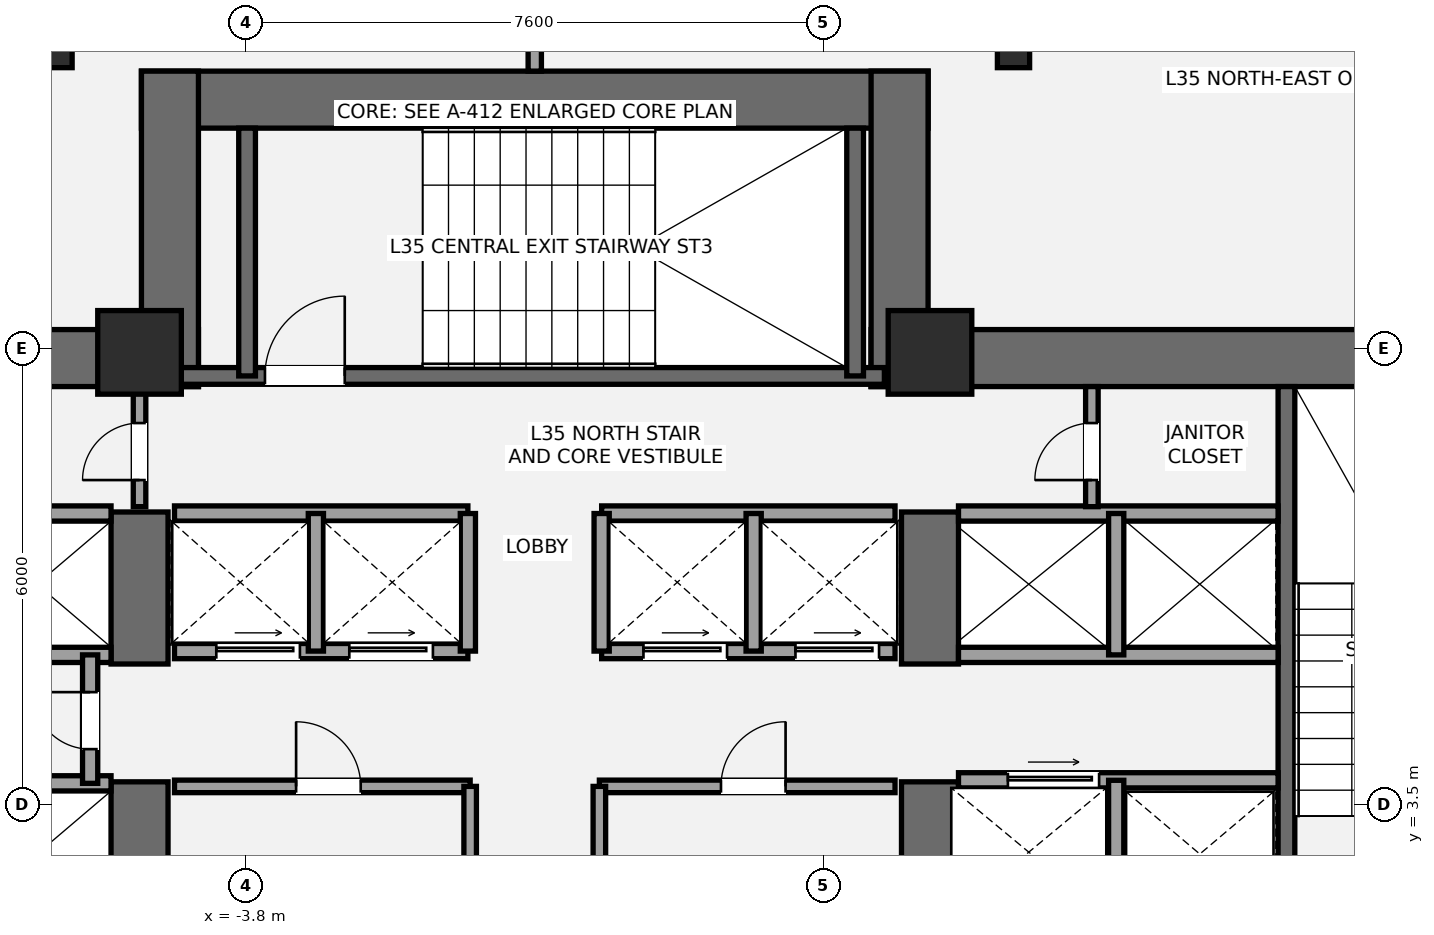
"""IFC4 building model, lengths in metres.
Left out: names, types, materials, properties, quantities, classifications, styles, units other than length and angle.
Written with IfcOpenShell. Run it as: python <this file> out.ifc"""

import sys

from ifc_helpers import new_model, si_unit, direction, frame, frame_2d, origin, origin_2d, place, context, subcontext, project, spatial, rectangle, i_section, extrude, element, fill, save


model = new_model("IFC4")
c1 = context("Model", 3, precision=1e-05, world=origin(), true_north=direction((0.0, 1.0)))
c2 = subcontext(c1, "Body", "Model", "MODEL_VIEW")
j1 = project(units=[si_unit("LENGTHUNIT", "METRE"), si_unit("PLANEANGLEUNIT", "RADIAN")], contexts=[c1])
p1 = place(None, origin())
s1 = spatial("IfcSite", under=j1, at=p1, CompositionType="ELEMENT")
p2 = place(p1, origin())
s2 = spatial("IfcBuilding", under=s1, at=p2, CompositionType="ELEMENT")
p3 = place(p2, frame((0.0, 0.0, 131.6)))
s3 = spatial("IfcBuildingStorey", under=s2, at=p3, CompositionType="ELEMENT", Elevation=131.6)
p4 = place(p3, frame((-13.9, 9.375, 0.0), z_axis=(0.0, 0.0, 1.0), x_axis=(1.0, 0.0, 0.0)))
e1 = element("IfcWall", 1, at=p4, inside=s3, PredefinedType="SHEAR", context=c2, shape_type="SweptSolid", body=[
    extrude(rectangle(XDim=9.475, YDim=0.75, at=frame_2d((4.737, 0.0))), origin(), (0.0, 0.0, 1.0), 3.5),
])
p5 = place(p3, frame((-5.2, 1.1, 0.0), z_axis=(0.0, 0.0, 1.0), x_axis=(0.0, 1.0, 0.0)))
e2 = element("IfcWall", 2, at=p5, inside=s3, PredefinedType="SHEAR", context=c2, shape_type="SweptSolid", body=[
    extrude(rectangle(XDim=2.7, YDim=0.75, at=frame_2d((1.35, 0.0))), origin(), (0.0, 0.0, 1.0), 3.5),
])
p6 = place(p3, frame((-5.2, 5.35, 0.0), z_axis=(0.0, 0.0, 1.0), x_axis=(0.0, 1.0, 0.0)))
e3 = element("IfcWall", 3, at=p6, inside=s3, PredefinedType="SHEAR", context=c2, shape_type="SweptSolid", body=[
    extrude(rectangle(XDim=2.0, YDim=0.75, at=frame_2d((1.0, 0.0))), origin(), (0.0, 0.0, 1.0), 3.5),
])
p7 = place(p3, frame((4.425, 9.375, 0.0), z_axis=(0.0, 0.0, 1.0), x_axis=(1.0, 0.0, 0.0)))
e4 = element("IfcWall", 4, at=p7, inside=s3, PredefinedType="SHEAR", context=c2, shape_type="SweptSolid", body=[
    extrude(rectangle(XDim=9.475, YDim=0.75, at=frame_2d((4.737, 0.0))), origin(), (0.0, 0.0, 1.0), 3.5),
])
p8 = place(p3, frame((5.2, 1.1, 0.0), z_axis=(0.0, 0.0, 1.0), x_axis=(0.0, 1.0, 0.0)))
e5 = element("IfcWall", 5, at=p8, inside=s3, PredefinedType="SHEAR", context=c2, shape_type="SweptSolid", body=[
    extrude(rectangle(XDim=2.7, YDim=0.75, at=frame_2d((1.35, 0.0))), origin(), (0.0, 0.0, 1.0), 3.5),
])
p9 = place(p3, frame((5.2, 5.35, 0.0), z_axis=(0.0, 0.0, 1.0), x_axis=(0.0, 1.0, 0.0)))
e6 = element("IfcWall", 6, at=p9, inside=s3, PredefinedType="SHEAR", context=c2, shape_type="SweptSolid", body=[
    extrude(rectangle(XDim=2.0, YDim=0.75, at=frame_2d((1.0, 0.0))), origin(), (0.0, 0.0, 1.0), 3.5),
])
p10 = place(p3, frame((9.89, 1.85, 0.0), z_axis=(0.0, 0.0, 1.0), x_axis=(0.0, 1.0, 0.0)))
e7 = element("IfcWall", 7, at=p10, inside=s3, PredefinedType="SHEAR", context=c2, shape_type="SweptSolid", body=[
    extrude(rectangle(XDim=7.15, YDim=0.22, at=frame_2d((3.575, 0.0))), origin(), (0.0, 0.0, 1.0), 3.5),
])
p11 = place(p3, frame((-5.175, 12.775, 0.0), z_axis=(0.0, 0.0, 1.0), x_axis=(1.0, 0.0, 0.0)))
e8 = element("IfcWall", 8, at=p11, inside=s3, PredefinedType="SHEAR", context=c2, shape_type="SweptSolid", body=[
    extrude(rectangle(XDim=10.35, YDim=0.75, at=frame_2d((5.175, 0.0))), origin(), (0.0, 0.0, 1.0), 3.5),
])
for number, where, z_axis, x_axis in (
    (9, (-4.8, 9.0, 0.0), (0.0, 0.0, 1.0), (0.0, 1.0, 0.0)),
    (10, (4.8, 9.0, 0.0), (0.0, 0.0, 1.0), (0.0, 1.0, 0.0)),
):
    element("IfcWall", number, at=place(p3, frame(where, z_axis=z_axis, x_axis=x_axis)), inside=s3, PredefinedType="SHEAR", context=c2, shape_type="SweptSolid", body=[
        extrude(rectangle(XDim=4.15, YDim=0.75, at=frame_2d((2.075, 0.0))), origin(), (0.0, 0.0, 1.0), 3.5),
    ])
p12 = place(p3, frame((-4.7, 9.14, 0.0), z_axis=(0.0, 0.0, 1.0), x_axis=(1.0, 0.0, 0.0)))
e11 = element("IfcWall", 11, at=p12, inside=s3, PredefinedType="SHEAR", context=c2, shape_type="SweptSolid", body=[
    extrude(rectangle(XDim=9.3, YDim=0.22, at=frame_2d((4.65, 0.0))), origin(), (0.0, 0.0, 1.0), 3.5),
])
p13 = place(p12, frame((1.15, 0.0, 0.0)))
e12 = element("IfcOpeningElement", 12, at=p13, cuts=e11, PredefinedType="OPENING", context=c2, shape_type="SweptSolid", body=[
    extrude(rectangle(XDim=1.05, YDim=2.15, at=frame_2d((0.525, 1.075))), frame((0.0, 0.12, 0.0), z_axis=(0.0, -1.0, 0.0), x_axis=(1.0, 0.0, 0.0)), (0.0, 0.0, 1.0), 0.24),
])
for number, where, z_axis, x_axis in (
    (13, (-3.785, 9.14, 0.0), (0.0, 0.0, 1.0), (0.0, 1.0, 0.0)),
    (14, (4.215, 9.14, 0.0), (0.0, 0.0, 1.0), (0.0, 1.0, 0.0)),
):
    element("IfcWall", number, at=place(p3, frame(where, z_axis=z_axis, x_axis=x_axis)), inside=s3, PredefinedType="SHEAR", context=c2, shape_type="SweptSolid", body=[
        extrude(rectangle(XDim=3.26, YDim=0.22, at=frame_2d((1.63, 0.0))), origin(), (0.0, 0.0, 1.0), 3.5),
    ])
for number, where, z_axis, x_axis in (
    (15, (-5.2, 9.45, 0.0), (0.0, 0.0, 1.0), (1.0, 0.0, 0.0)),
    (16, (5.2, 9.45, 0.0), (0.0, 0.0, 1.0), (1.0, 0.0, 0.0)),
):
    element("IfcColumn", number, at=place(p3, frame(where, z_axis=z_axis, x_axis=x_axis)), inside=s3, PredefinedType="COLUMN", context=c2, shape_type="SweptSolid", body=[
        extrude(rectangle(XDim=1.1, YDim=1.1, at=origin_2d()), origin(), (0.0, 0.0, 1.0), 3.5),
    ])
for number, where, z_axis, x_axis in (
    (17, (6.299, 13.433, 0.0), (0.0, 0.0, 1.0), (1.0, 0.0, 0.0)),
    (18, (-6.299, 13.433, 0.0), (0.0, 0.0, 1.0), (1.0, 0.0, 0.0)),
):
    element("IfcColumn", number, at=place(p3, frame(where, z_axis=z_axis, x_axis=x_axis)), inside=s3, PredefinedType="COLUMN", context=c2, shape_type="SweptSolid", body=[
        extrude(i_section(OverallWidth=0.424, OverallDepth=0.474, WebThickness=0.048, FlangeThickness=0.077, at=origin_2d()), origin(), (0.0, 0.0, 1.0), 3.5),
    ])
for number, where, z_axis, x_axis in (
    (19, (-9.78, 3.78, 0.0), (0.0, 0.0, 1.0), (1.0, 0.0, 0.0)),
    (20, (-9.78, 5.47, 0.0), (0.0, 0.0, 1.0), (1.0, 0.0, 0.0)),
    (21, (-9.78, 7.33, 0.0), (0.0, 0.0, 1.0), (1.0, 0.0, 0.0)),
):
    element("IfcWall", number, at=place(p3, frame(where, z_axis=z_axis, x_axis=x_axis)), inside=s3, PredefinedType="SOLIDWALL", context=c2, shape_type="SweptSolid", body=[
        extrude(rectangle(XDim=4.205, YDim=0.2, at=frame_2d((2.103, 0.0))), origin(), (0.0, 0.0, 1.0), 3.26),
    ])
p14 = place(p3, frame((-5.85, 3.78, 0.0), z_axis=(0.0, 0.0, 1.0), x_axis=(0.0, 1.0, 0.0)))
e22 = element("IfcWall", 22, at=p14, inside=s3, PredefinedType="SOLIDWALL", context=c2, shape_type="SweptSolid", body=[
    extrude(rectangle(XDim=1.69, YDim=0.2, at=frame_2d((0.845, 0.0))), origin(), (0.0, 0.0, 1.0), 3.26),
])
p15 = place(p14, frame((0.45, 0.0, 0.0)))
e23 = element("IfcOpeningElement", 23, at=p15, cuts=e22, PredefinedType="OPENING", context=c2, shape_type="SweptSolid", body=[
    extrude(rectangle(XDim=0.75, YDim=2.1, at=frame_2d((0.375, 1.05))), frame((0.0, 0.11, 0.0), z_axis=(0.0, -1.0, 0.0), x_axis=(1.0, 0.0, 0.0)), (0.0, 0.0, 1.0), 0.22),
])
p16 = place(p3, frame((5.575, 3.82, 0.0), z_axis=(0.0, 0.0, 1.0), x_axis=(1.0, 0.0, 0.0)))
e24 = element("IfcWall", 24, at=p16, inside=s3, PredefinedType="SOLIDWALL", context=c2, shape_type="SweptSolid", body=[
    extrude(rectangle(XDim=4.205, YDim=0.2, at=frame_2d((2.103, 0.0))), origin(), (0.0, 0.0, 1.0), 3.26),
])
p17 = place(p16, frame((0.65, 0.0, 0.0)))
e25 = element("IfcOpeningElement", 25, at=p17, cuts=e24, PredefinedType="OPENING", context=c2, shape_type="SweptSolid", body=[
    extrude(rectangle(XDim=1.2, YDim=2.2, at=frame_2d((0.6, 1.1))), frame((0.0, 0.11, 0.0), z_axis=(0.0, -1.0, 0.0), x_axis=(1.0, 0.0, 0.0)), (0.0, 0.0, 1.0), 0.22),
])
p18 = place(p3, frame((7.65, 1.85, 0.0), z_axis=(0.0, 0.0, 1.0), x_axis=(0.0, 1.0, 0.0)))
e26 = element("IfcWall", 26, at=p18, inside=s3, PredefinedType="SOLIDWALL", context=c2, shape_type="SweptSolid", body=[
    extrude(rectangle(XDim=1.97, YDim=0.2, at=frame_2d((0.985, 0.0))), origin(), (0.0, 0.0, 1.0), 3.26),
])
for number, where, z_axis, x_axis in (
    (27, (5.575, 5.47, 0.0), (0.0, 0.0, 1.0), (1.0, 0.0, 0.0)),
    (28, (5.575, 7.33, 0.0), (0.0, 0.0, 1.0), (1.0, 0.0, 0.0)),
):
    element("IfcWall", number, at=place(p3, frame(where, z_axis=z_axis, x_axis=x_axis)), inside=s3, PredefinedType="SOLIDWALL", context=c2, shape_type="SweptSolid", body=[
        extrude(rectangle(XDim=4.205, YDim=0.2, at=frame_2d((2.103, 0.0))), origin(), (0.0, 0.0, 1.0), 3.26),
    ])
p19 = place(p3, frame((7.65, 5.47, 0.0), z_axis=(0.0, 0.0, 1.0), x_axis=(0.0, 1.0, 0.0)))
e29 = element("IfcWall", 29, at=p19, inside=s3, PredefinedType="SOLIDWALL", context=c2, shape_type="SweptSolid", body=[
    extrude(rectangle(XDim=1.86, YDim=0.2, at=frame_2d((0.93, 0.0))), origin(), (0.0, 0.0, 1.0), 3.26),
])
p20 = place(p3, frame((-4.74, 3.74, 0.0), z_axis=(0.0, 0.0, 1.0), x_axis=(1.0, 0.0, 0.0)))
e30 = element("IfcWall", 30, at=p20, inside=s3, PredefinedType="PARTITIONING", context=c2, shape_type="SweptSolid", body=[
    extrude(rectangle(XDim=3.89, YDim=0.165, at=frame_2d((1.945, 0.0))), origin(), (0.0, 0.0, 1.0), 3.26),
])
p21 = place(p20, frame((1.6, 0.0, 0.0)))
e31 = element("IfcOpeningElement", 31, at=p21, cuts=e30, PredefinedType="OPENING", context=c2, shape_type="SweptSolid", body=[
    extrude(rectangle(XDim=0.85, YDim=2.1, at=frame_2d((0.425, 1.05))), frame((0.0, 0.093, 0.0), z_axis=(0.0, -1.0, 0.0), x_axis=(1.0, 0.0, 0.0)), (0.0, 0.0, 1.0), 0.185),
])
p22 = place(p3, frame((-0.85, 1.92, 0.0), z_axis=(0.0, 0.0, 1.0), x_axis=(0.0, 1.0, 0.0)))
e32 = element("IfcWall", 32, at=p22, inside=s3, PredefinedType="PARTITIONING", context=c2, shape_type="SweptSolid", body=[
    extrude(rectangle(XDim=1.82, YDim=0.165, at=frame_2d((0.91, 0.0))), origin(), (0.0, 0.0, 1.0), 3.26),
])
p23 = place(p3, frame((0.85, 3.74, 0.0), z_axis=(0.0, 0.0, 1.0), x_axis=(1.0, 0.0, 0.0)))
e33 = element("IfcWall", 33, at=p23, inside=s3, PredefinedType="PARTITIONING", context=c2, shape_type="SweptSolid", body=[
    extrude(rectangle(XDim=3.89, YDim=0.165, at=frame_2d((1.945, 0.0))), origin(), (0.0, 0.0, 1.0), 3.26),
])
p24 = place(p23, frame((1.6, 0.0, 0.0)))
e34 = element("IfcOpeningElement", 34, at=p24, cuts=e33, PredefinedType="OPENING", context=c2, shape_type="SweptSolid", body=[
    extrude(rectangle(XDim=0.85, YDim=2.1, at=frame_2d((0.425, 1.05))), frame((0.0, 0.093, 0.0), z_axis=(0.0, -1.0, 0.0), x_axis=(1.0, 0.0, 0.0)), (0.0, 0.0, 1.0), 0.185),
])
p25 = place(p3, frame((0.85, 1.92, 0.0), z_axis=(0.0, 0.0, 1.0), x_axis=(0.0, 1.0, 0.0)))
e35 = element("IfcWall", 35, at=p25, inside=s3, PredefinedType="PARTITIONING", context=c2, shape_type="SweptSolid", body=[
    extrude(rectangle(XDim=1.82, YDim=0.165, at=frame_2d((0.91, 0.0))), origin(), (0.0, 0.0, 1.0), 3.26),
])
p26 = place(p3, frame((-4.74, 5.52, 0.0), z_axis=(0.0, 0.0, 1.0), x_axis=(1.0, 0.0, 0.0)))
e36 = element("IfcWall", 36, at=p26, inside=s3, PredefinedType="SOLIDWALL", context=c2, shape_type="SweptSolid", body=[
    extrude(rectangle(XDim=3.86, YDim=0.2, at=frame_2d((1.93, 0.0))), origin(), (0.0, 0.0, 1.0), 3.26),
])
p27 = place(p26, frame((0.55, 0.0, 0.0)))
e37 = element("IfcOpeningElement", 37, at=p27, cuts=e36, PredefinedType="OPENING", context=c2, shape_type="SweptSolid", body=[
    extrude(rectangle(XDim=1.1, YDim=2.2, at=frame_2d((0.55, 1.1))), frame((0.0, 0.11, 0.0), z_axis=(0.0, -1.0, 0.0), x_axis=(1.0, 0.0, 0.0)), (0.0, 0.0, 1.0), 0.22),
])
p28 = place(p26, frame((2.3, 0.0, 0.0)))
e38 = element("IfcOpeningElement", 38, at=p28, cuts=e36, PredefinedType="OPENING", context=c2, shape_type="SweptSolid", body=[
    extrude(rectangle(XDim=1.1, YDim=2.2, at=frame_2d((0.55, 1.1))), frame((0.0, 0.11, 0.0), z_axis=(0.0, -1.0, 0.0), x_axis=(1.0, 0.0, 0.0)), (0.0, 0.0, 1.0), 0.22),
])
p29 = place(p3, frame((0.88, 5.52, 0.0), z_axis=(0.0, 0.0, 1.0), x_axis=(1.0, 0.0, 0.0)))
e39 = element("IfcWall", 39, at=p29, inside=s3, PredefinedType="SOLIDWALL", context=c2, shape_type="SweptSolid", body=[
    extrude(rectangle(XDim=3.86, YDim=0.2, at=frame_2d((1.93, 0.0))), origin(), (0.0, 0.0, 1.0), 3.26),
])
p30 = place(p29, frame((0.55, 0.0, 0.0)))
e40 = element("IfcOpeningElement", 40, at=p30, cuts=e39, PredefinedType="OPENING", context=c2, shape_type="SweptSolid", body=[
    extrude(rectangle(XDim=1.1, YDim=2.2, at=frame_2d((0.55, 1.1))), frame((0.0, 0.11, 0.0), z_axis=(0.0, -1.0, 0.0), x_axis=(1.0, 0.0, 0.0)), (0.0, 0.0, 1.0), 0.22),
])
p31 = place(p29, frame((2.55, 0.0, 0.0)))
e41 = element("IfcOpeningElement", 41, at=p31, cuts=e39, PredefinedType="OPENING", context=c2, shape_type="SweptSolid", body=[
    extrude(rectangle(XDim=1.1, YDim=2.2, at=frame_2d((0.55, 1.1))), frame((0.0, 0.11, 0.0), z_axis=(0.0, -1.0, 0.0), x_axis=(1.0, 0.0, 0.0)), (0.0, 0.0, 1.0), 0.22),
])
for number, where, z_axis, x_axis in (
    (42, (-4.74, 7.33, 0.0), (0.0, 0.0, 1.0), (1.0, 0.0, 0.0)),
    (43, (0.88, 7.33, 0.0), (0.0, 0.0, 1.0), (1.0, 0.0, 0.0)),
):
    element("IfcWall", number, at=place(p3, frame(where, z_axis=z_axis, x_axis=x_axis)), inside=s3, PredefinedType="SOLIDWALL", context=c2, shape_type="SweptSolid", body=[
        extrude(rectangle(XDim=3.86, YDim=0.2, at=frame_2d((1.93, 0.0))), origin(), (0.0, 0.0, 1.0), 3.26),
    ])
for number, where, z_axis, x_axis in (
    (44, (-2.88, 5.52, 0.0), (0.0, 0.0, 1.0), (0.0, 1.0, 0.0)),
    (45, (2.88, 5.52, 0.0), (0.0, 0.0, 1.0), (0.0, 1.0, 0.0)),
    (46, (-0.88, 5.52, 0.0), (0.0, 0.0, 1.0), (0.0, 1.0, 0.0)),
    (47, (0.88, 5.52, 0.0), (0.0, 0.0, 1.0), (0.0, 1.0, 0.0)),
):
    element("IfcWall", number, at=place(p3, frame(where, z_axis=z_axis, x_axis=x_axis)), inside=s3, PredefinedType="SOLIDWALL", context=c2, shape_type="SweptSolid", body=[
        extrude(rectangle(XDim=1.81, YDim=0.2, at=frame_2d((0.905, 0.0))), origin(), (0.0, 0.0, 1.0), 3.26),
    ])
p32 = place(p3, frame((-5.2, 7.42, 0.0), z_axis=(0.0, 0.0, 1.0), x_axis=(0.0, 1.0, 0.0)))
e48 = element("IfcWall", 48, at=p32, inside=s3, PredefinedType="PARTITIONING", context=c2, shape_type="SweptSolid", body=[
    extrude(rectangle(XDim=1.58, YDim=0.165, at=frame_2d((0.79, 0.0))), origin(), (0.0, 0.0, 1.0), 3.26),
])
p33 = place(p32, frame((0.35, 0.0, 0.0)))
e49 = element("IfcOpeningElement", 49, at=p33, cuts=e48, PredefinedType="OPENING", context=c2, shape_type="SweptSolid", body=[
    extrude(rectangle(XDim=0.75, YDim=2.1, at=frame_2d((0.375, 1.05))), frame((0.0, 0.093, 0.0), z_axis=(0.0, -1.0, 0.0), x_axis=(1.0, 0.0, 0.0)), (0.0, 0.0, 1.0), 0.185),
])
p34 = place(p3, frame((7.33, 7.42, 0.0), z_axis=(0.0, 0.0, 1.0), x_axis=(0.0, 1.0, 0.0)))
e50 = element("IfcWall", 50, at=p34, inside=s3, PredefinedType="PARTITIONING", context=c2, shape_type="SweptSolid", body=[
    extrude(rectangle(XDim=1.58, YDim=0.165, at=frame_2d((0.79, 0.0))), origin(), (0.0, 0.0, 1.0), 3.26),
])
p35 = place(p34, frame((0.35, 0.0, 0.0)))
e51 = element("IfcOpeningElement", 51, at=p35, cuts=e50, PredefinedType="OPENING", context=c2, shape_type="SweptSolid", body=[
    extrude(rectangle(XDim=0.75, YDim=2.1, at=frame_2d((0.375, 1.05))), frame((0.0, 0.093, 0.0), z_axis=(0.0, -1.0, 0.0), x_axis=(1.0, 0.0, 0.0)), (0.0, 0.0, 1.0), 0.185),
])
p36 = place(p3, frame((0.0, 13.15, 0.0), z_axis=(0.0, 0.0, 1.0), x_axis=(0.0, 1.0, 0.0)))
e52 = element("IfcWall", 52, at=p36, inside=s3, PredefinedType="PARTITIONING", context=c2, shape_type="SweptSolid", body=[
    extrude(rectangle(XDim=3.575, YDim=0.175, at=frame_2d((1.788, 0.0))), origin(), (0.0, 0.0, 1.0), 3.26),
])
p37 = place(p13, origin())
e53 = element("IfcDoor", 53, at=p37, inside=s3, OperationType="SINGLE_SWING_RIGHT", PredefinedType="DOOR", context=c2, shape_type="SweptSolid", body=[
    extrude(rectangle(XDim=1.05, YDim=2.15, at=frame_2d((0.525, 1.075))), frame((0.0, 0.025, 0.0), z_axis=(0.0, -1.0, 0.0), x_axis=(1.0, 0.0, 0.0)), (0.0, 0.0, 1.0), 0.05),
])
fill(e12, e53)
p38 = place(p15, origin())
e54 = element("IfcDoor", 54, at=p38, inside=s3, OperationType="SINGLE_SWING_RIGHT", PredefinedType="DOOR", context=c2, shape_type="SweptSolid", body=[
    extrude(rectangle(XDim=0.75, YDim=2.1, at=frame_2d((0.375, 1.05))), frame((0.0, 0.025, 0.0), z_axis=(0.0, -1.0, 0.0), x_axis=(1.0, 0.0, 0.0)), (0.0, 0.0, 1.0), 0.05),
])
fill(e23, e54)
p39 = place(p17, origin())
e55 = element("IfcDoor", 55, at=p39, inside=s3, OperationType="SLIDING_TO_RIGHT", PredefinedType="DOOR", context=c2, shape_type="SweptSolid", body=[
    extrude(rectangle(XDim=1.2, YDim=2.2, at=frame_2d((0.6, 1.1))), frame((0.0, 0.025, 0.0), z_axis=(0.0, -1.0, 0.0), x_axis=(1.0, 0.0, 0.0)), (0.0, 0.0, 1.0), 0.05),
])
fill(e25, e55)
p40 = place(p21, origin())
e56 = element("IfcDoor", 56, at=p40, inside=s3, OperationType="SINGLE_SWING_LEFT", PredefinedType="DOOR", context=c2, shape_type="SweptSolid", body=[
    extrude(rectangle(XDim=0.85, YDim=2.1, at=frame_2d((0.425, 1.05))), frame((0.0, 0.025, 0.0), z_axis=(0.0, -1.0, 0.0), x_axis=(1.0, 0.0, 0.0)), (0.0, 0.0, 1.0), 0.05),
])
fill(e31, e56)
p41 = place(p24, origin())
e57 = element("IfcDoor", 57, at=p41, inside=s3, OperationType="SINGLE_SWING_RIGHT", PredefinedType="DOOR", context=c2, shape_type="SweptSolid", body=[
    extrude(rectangle(XDim=0.85, YDim=2.1, at=frame_2d((0.425, 1.05))), frame((0.0, 0.025, 0.0), z_axis=(0.0, -1.0, 0.0), x_axis=(1.0, 0.0, 0.0)), (0.0, 0.0, 1.0), 0.05),
])
fill(e34, e57)
p42 = place(p27, origin())
e58 = element("IfcDoor", 58, at=p42, inside=s3, OperationType="SLIDING_TO_LEFT", PredefinedType="DOOR", context=c2, shape_type="SweptSolid", body=[
    extrude(rectangle(XDim=1.1, YDim=2.2, at=frame_2d((0.55, 1.1))), frame((0.0, 0.025, 0.0), z_axis=(0.0, -1.0, 0.0), x_axis=(1.0, 0.0, 0.0)), (0.0, 0.0, 1.0), 0.05),
])
fill(e37, e58)
p43 = place(p28, origin())
e59 = element("IfcDoor", 59, at=p43, inside=s3, OperationType="SLIDING_TO_LEFT", PredefinedType="DOOR", context=c2, shape_type="SweptSolid", body=[
    extrude(rectangle(XDim=1.1, YDim=2.2, at=frame_2d((0.55, 1.1))), frame((0.0, 0.025, 0.0), z_axis=(0.0, -1.0, 0.0), x_axis=(1.0, 0.0, 0.0)), (0.0, 0.0, 1.0), 0.05),
])
fill(e38, e59)
p44 = place(p30, origin())
e60 = element("IfcDoor", 60, at=p44, inside=s3, OperationType="SLIDING_TO_LEFT", PredefinedType="DOOR", context=c2, shape_type="SweptSolid", body=[
    extrude(rectangle(XDim=1.1, YDim=2.2, at=frame_2d((0.55, 1.1))), frame((0.0, 0.025, 0.0), z_axis=(0.0, -1.0, 0.0), x_axis=(1.0, 0.0, 0.0)), (0.0, 0.0, 1.0), 0.05),
])
fill(e40, e60)
p45 = place(p31, origin())
e61 = element("IfcDoor", 61, at=p45, inside=s3, OperationType="SLIDING_TO_LEFT", PredefinedType="DOOR", context=c2, shape_type="SweptSolid", body=[
    extrude(rectangle(XDim=1.1, YDim=2.2, at=frame_2d((0.55, 1.1))), frame((0.0, 0.025, 0.0), z_axis=(0.0, -1.0, 0.0), x_axis=(1.0, 0.0, 0.0)), (0.0, 0.0, 1.0), 0.05),
])
fill(e41, e61)
p46 = place(p33, origin())
e62 = element("IfcDoor", 62, at=p46, inside=s3, OperationType="SINGLE_SWING_LEFT", PredefinedType="DOOR", context=c2, shape_type="SweptSolid", body=[
    extrude(rectangle(XDim=0.75, YDim=2.1, at=frame_2d((0.375, 1.05))), frame((0.0, 0.025, 0.0), z_axis=(0.0, -1.0, 0.0), x_axis=(1.0, 0.0, 0.0)), (0.0, 0.0, 1.0), 0.05),
])
fill(e49, e62)
p47 = place(p35, origin())
e63 = element("IfcDoor", 63, at=p47, inside=s3, OperationType="SINGLE_SWING_LEFT", PredefinedType="DOOR", context=c2, shape_type="SweptSolid", body=[
    extrude(rectangle(XDim=0.75, YDim=2.1, at=frame_2d((0.375, 1.05))), frame((0.0, 0.025, 0.0), z_axis=(0.0, -1.0, 0.0), x_axis=(1.0, 0.0, 0.0)), (0.0, 0.0, 1.0), 0.05),
])
fill(e51, e63)
save(model, sys.argv[1])
